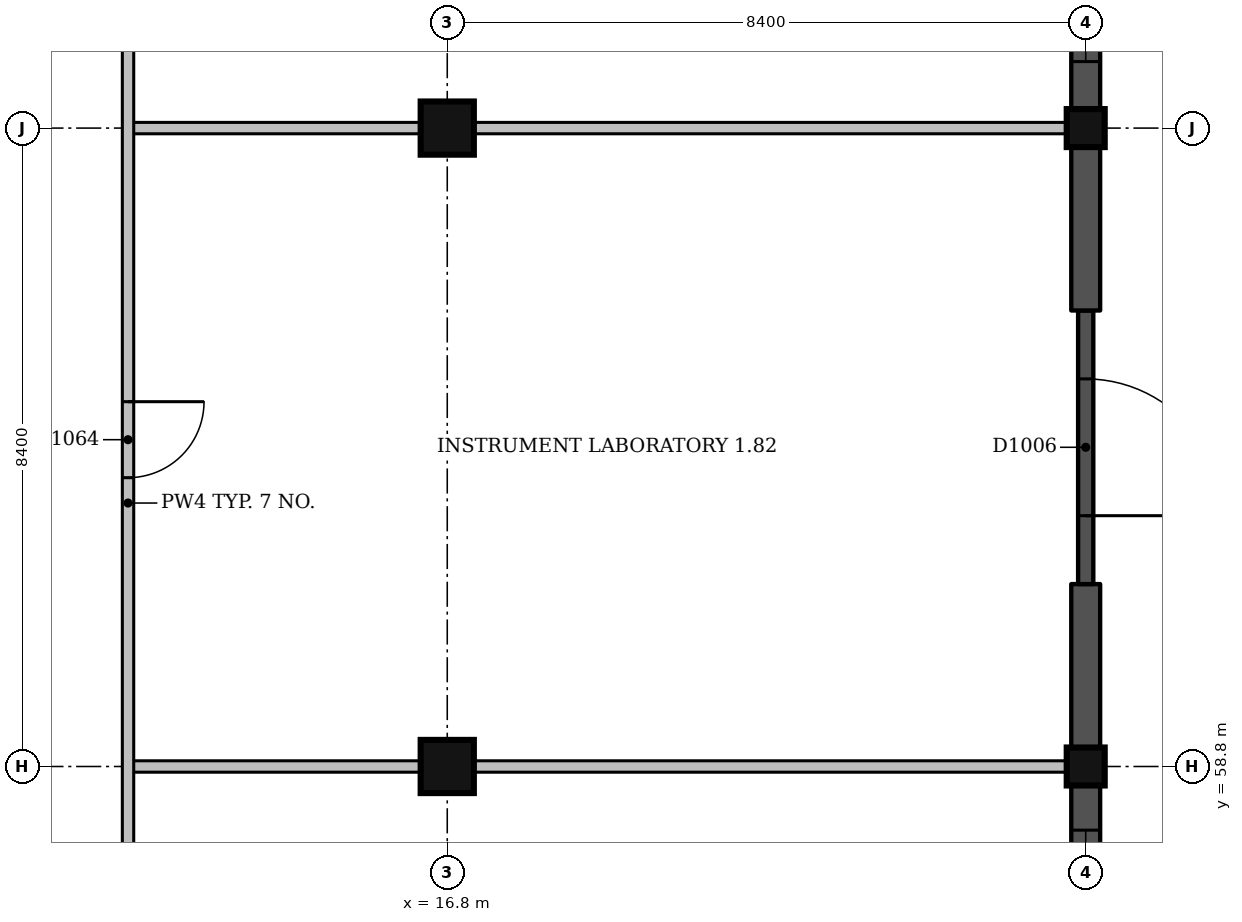
"""IFC4 building model, lengths in metres.
Left out: names, types, materials, properties, quantities, classifications, styles, units other than length and angle.
Written with IfcOpenShell. Run it as: python <this file> out.ifc"""

import sys

from ifc_helpers import new_model, si_unit, direction, frame, frame_2d, origin, origin_2d, place, context, subcontext, project, spatial, rectangle, extrude, element, fill, save


model = new_model("IFC4")
c1 = context("Model", 3, precision=1e-05, world=origin(), true_north=direction((0.0, 1.0)))
c2 = subcontext(c1, "Body", "Model", "MODEL_VIEW")
j1 = project(units=[si_unit("LENGTHUNIT", "METRE"), si_unit("PLANEANGLEUNIT", "RADIAN")], contexts=[c1])
p1 = place(None, origin())
s1 = spatial("IfcSite", under=j1, at=p1, CompositionType="ELEMENT")
p2 = place(p1, origin())
s2 = spatial("IfcBuilding", under=s1, at=p2, CompositionType="ELEMENT")
p3 = place(p2, frame((0.0, 0.0, 4.5)))
s3 = spatial("IfcBuildingStorey", under=s2, at=p3, CompositionType="ELEMENT", Elevation=4.5)
for number, where, z_axis, x_axis in (
    (1, (16.8, 58.8, -1.5), (0.0, 0.0, 1.0), (1.0, 0.0, 0.0)),
    (2, (16.8, 67.2, -1.5), (0.0, 0.0, 1.0), (1.0, 0.0, 0.0)),
):
    element("IfcColumn", number, at=place(p3, frame(where, z_axis=z_axis, x_axis=x_axis)), inside=s3, PredefinedType="COLUMN", context=c2, shape_type="SweptSolid", body=[
        extrude(rectangle(XDim=0.7, YDim=0.7, at=origin_2d()), origin(), (0.0, 0.0, 1.0), 6.0),
    ])
for number, where, z_axis, x_axis in (
    (3, (25.2, 58.8, -1.5), (0.0, 0.0, 1.0), (1.0, 0.0, 0.0)),
    (4, (25.2, 67.2, -1.5), (0.0, 0.0, 1.0), (1.0, 0.0, 0.0)),
):
    element("IfcColumn", number, at=place(p3, frame(where, z_axis=z_axis, x_axis=x_axis)), inside=s3, PredefinedType="COLUMN", context=c2, shape_type="SweptSolid", body=[
        extrude(rectangle(XDim=0.5, YDim=0.5, at=origin_2d()), origin(), (0.0, 0.0, 1.0), 6.0),
    ])
p4 = place(p3, frame((25.2, 54.975, 0.0), z_axis=(0.0, 0.0, 1.0), x_axis=(0.0, 1.0, 0.0)))
e5 = element("IfcWall", 5, at=p4, inside=s3, PredefinedType="SOLIDWALL", context=c2, shape_type="SweptSolid", body=[
    extrude(rectangle(XDim=3.575, YDim=0.38, at=frame_2d((1.788, 0.0))), origin(), (0.0, 0.0, 1.0), 4.2),
])
p5 = place(p4, frame((0.587, 0.0, 1.2)))
e6 = element("IfcOpeningElement", 6, at=p5, cuts=e5, PredefinedType="OPENING", context=c2, shape_type="SweptSolid", body=[
    extrude(rectangle(XDim=2.4, YDim=1.5, at=frame_2d((1.2, 0.75))), frame((0.0, 0.2, 0.0), z_axis=(0.0, -1.0, 0.0), x_axis=(1.0, 0.0, 0.0)), (0.0, 0.0, 1.0), 0.4),
])
p6 = place(p3, frame((25.2, 59.05, 0.0), z_axis=(0.0, 0.0, 1.0), x_axis=(0.0, 1.0, 0.0)))
e7 = element("IfcWall", 7, at=p6, inside=s3, PredefinedType="SOLIDWALL", context=c2, shape_type="SweptSolid", body=[
    extrude(rectangle(XDim=2.15, YDim=0.38, at=frame_2d((1.075, 0.0))), origin(), (0.0, 0.0, 1.0), 3.35),
])
p7 = place(p3, frame((25.2, 61.2, 0.0), z_axis=(0.0, 0.0, 1.0), x_axis=(0.0, 1.0, 0.0)))
e8 = element("IfcWall", 8, at=p7, inside=s3, PredefinedType="SOLIDWALL", context=c2, shape_type="SweptSolid", body=[
    extrude(rectangle(XDim=3.6, YDim=0.2, at=frame_2d((1.8, 0.0))), origin(), (0.0, 0.0, 1.0), 3.35),
])
p8 = place(p7, frame((0.9, 0.0, 0.0)))
e9 = element("IfcOpeningElement", 9, at=p8, cuts=e8, PredefinedType="OPENING", context=c2, shape_type="SweptSolid", body=[
    extrude(rectangle(XDim=1.8, YDim=2.4, at=frame_2d((0.9, 1.2))), frame((0.0, 0.11, 0.0), z_axis=(0.0, -1.0, 0.0), x_axis=(1.0, 0.0, 0.0)), (0.0, 0.0, 1.0), 0.22),
])
p9 = place(p3, frame((25.2, 64.8, 0.0), z_axis=(0.0, 0.0, 1.0), x_axis=(0.0, 1.0, 0.0)))
e10 = element("IfcWall", 10, at=p9, inside=s3, PredefinedType="SOLIDWALL", context=c2, shape_type="SweptSolid", body=[
    extrude(rectangle(XDim=2.15, YDim=0.38, at=frame_2d((1.075, 0.0))), origin(), (0.0, 0.0, 1.0), 3.35),
])
p10 = place(p3, frame((25.2, 67.45, 0.0), z_axis=(0.0, 0.0, 1.0), x_axis=(0.0, 1.0, 0.0)))
e11 = element("IfcWall", 11, at=p10, inside=s3, PredefinedType="SOLIDWALL", context=c2, shape_type="SweptSolid", body=[
    extrude(rectangle(XDim=3.65, YDim=0.38, at=frame_2d((1.825, 0.0))), origin(), (0.0, 0.0, 1.0), 3.35),
])
p11 = place(p10, frame((0.625, 0.0, 1.2)))
e12 = element("IfcOpeningElement", 12, at=p11, cuts=e11, PredefinedType="OPENING", context=c2, shape_type="SweptSolid", body=[
    extrude(rectangle(XDim=2.4, YDim=1.5, at=frame_2d((1.2, 0.75))), frame((0.0, 0.2, 0.0), z_axis=(0.0, -1.0, 0.0), x_axis=(1.0, 0.0, 0.0)), (0.0, 0.0, 1.0), 0.4),
])
p12 = place(p3, frame((12.6, 58.8, 0.0), z_axis=(0.0, 0.0, 1.0), x_axis=(1.0, 0.0, 0.0)))
e13 = element("IfcWall", 13, at=p12, inside=s3, PredefinedType="PARTITIONING", context=c2, shape_type="SweptSolid", body=[
    extrude(rectangle(XDim=3.85, YDim=0.15, at=frame_2d((1.925, 0.0))), origin(), (0.0, 0.0, 1.0), 3.4),
])
p13 = place(p3, frame((17.15, 58.8, 0.0), z_axis=(0.0, 0.0, 1.0), x_axis=(1.0, 0.0, 0.0)))
e14 = element("IfcWall", 14, at=p13, inside=s3, PredefinedType="PARTITIONING", context=c2, shape_type="SweptSolid", body=[
    extrude(rectangle(XDim=7.8, YDim=0.15, at=frame_2d((3.9, 0.0))), origin(), (0.0, 0.0, 1.0), 3.4),
])
p14 = place(p3, frame((12.6, 67.2, 0.0), z_axis=(0.0, 0.0, 1.0), x_axis=(1.0, 0.0, 0.0)))
e15 = element("IfcWall", 15, at=p14, inside=s3, PredefinedType="PARTITIONING", context=c2, shape_type="SweptSolid", body=[
    extrude(rectangle(XDim=3.85, YDim=0.15, at=frame_2d((1.925, 0.0))), origin(), (0.0, 0.0, 1.0), 3.4),
])
p15 = place(p3, frame((17.15, 67.2, 0.0), z_axis=(0.0, 0.0, 1.0), x_axis=(1.0, 0.0, 0.0)))
e16 = element("IfcWall", 16, at=p15, inside=s3, PredefinedType="PARTITIONING", context=c2, shape_type="SweptSolid", body=[
    extrude(rectangle(XDim=7.8, YDim=0.15, at=frame_2d((3.9, 0.0))), origin(), (0.0, 0.0, 1.0), 3.4),
])
p16 = place(p3, frame((12.6, 50.4, 0.0), z_axis=(0.0, 0.0, 1.0), x_axis=(0.0, 1.0, 0.0)))
e17 = element("IfcWall", 17, at=p16, inside=s3, PredefinedType="PARTITIONING", context=c2, shape_type="SweptSolid", body=[
    extrude(rectangle(XDim=25.2, YDim=0.15, at=frame_2d((12.6, 0.0))), origin(), (0.0, 0.0, 1.0), 3.4),
])
p17 = place(p16, frame((3.8, 0.0, 0.0)))
e18 = element("IfcOpeningElement", 18, at=p17, cuts=e17, PredefinedType="OPENING", context=c2, shape_type="SweptSolid", body=[
    extrude(rectangle(XDim=1.0, YDim=2.1, at=frame_2d((0.5, 1.05))), frame((0.0, 0.085, 0.0), z_axis=(0.0, -1.0, 0.0), x_axis=(1.0, 0.0, 0.0)), (0.0, 0.0, 1.0), 0.17),
])
p18 = place(p16, frame((12.2, 0.0, 0.0)))
e19 = element("IfcOpeningElement", 19, at=p18, cuts=e17, PredefinedType="OPENING", context=c2, shape_type="SweptSolid", body=[
    extrude(rectangle(XDim=1.0, YDim=2.1, at=frame_2d((0.5, 1.05))), frame((0.0, 0.085, 0.0), z_axis=(0.0, -1.0, 0.0), x_axis=(1.0, 0.0, 0.0)), (0.0, 0.0, 1.0), 0.17),
])
p19 = place(p5, origin())
e20 = element("IfcWindow", 20, at=p19, inside=s3, PartitioningType="SINGLE_PANEL", PredefinedType="WINDOW", context=c2, shape_type="SweptSolid", body=[
    extrude(rectangle(XDim=2.4, YDim=1.5, at=frame_2d((1.2, 0.75))), frame((0.0, 0.15, 0.0), z_axis=(0.0, -1.0, 0.0), x_axis=(1.0, 0.0, 0.0)), (0.0, 0.0, 1.0), 0.06),
])
fill(e6, e20)
p20 = place(p8, origin())
e21 = element("IfcDoor", 21, at=p20, inside=s3, OperationType="SINGLE_SWING_LEFT", PredefinedType="DOOR", context=c2, shape_type="SweptSolid", body=[
    extrude(rectangle(XDim=1.8, YDim=2.4, at=frame_2d((0.9, 1.2))), frame((0.0, 0.025, 0.0), z_axis=(0.0, -1.0, 0.0), x_axis=(1.0, 0.0, 0.0)), (0.0, 0.0, 1.0), 0.05),
])
fill(e9, e21)
p21 = place(p11, origin())
e22 = element("IfcWindow", 22, at=p21, inside=s3, PartitioningType="SINGLE_PANEL", PredefinedType="WINDOW", context=c2, shape_type="SweptSolid", body=[
    extrude(rectangle(XDim=2.4, YDim=1.5, at=frame_2d((1.2, 0.75))), frame((0.0, 0.15, 0.0), z_axis=(0.0, -1.0, 0.0), x_axis=(1.0, 0.0, 0.0)), (0.0, 0.0, 1.0), 0.06),
])
fill(e12, e22)
p22 = place(p18, origin())
e23 = element("IfcDoor", 23, at=p22, inside=s3, OperationType="SINGLE_SWING_RIGHT", PredefinedType="DOOR", context=c2, shape_type="SweptSolid", body=[
    extrude(rectangle(XDim=1.0, YDim=2.1, at=frame_2d((0.5, 1.05))), frame((0.0, 0.025, 0.0), z_axis=(0.0, -1.0, 0.0), x_axis=(1.0, 0.0, 0.0)), (0.0, 0.0, 1.0), 0.05),
])
fill(e19, e23)
save(model, sys.argv[1])
